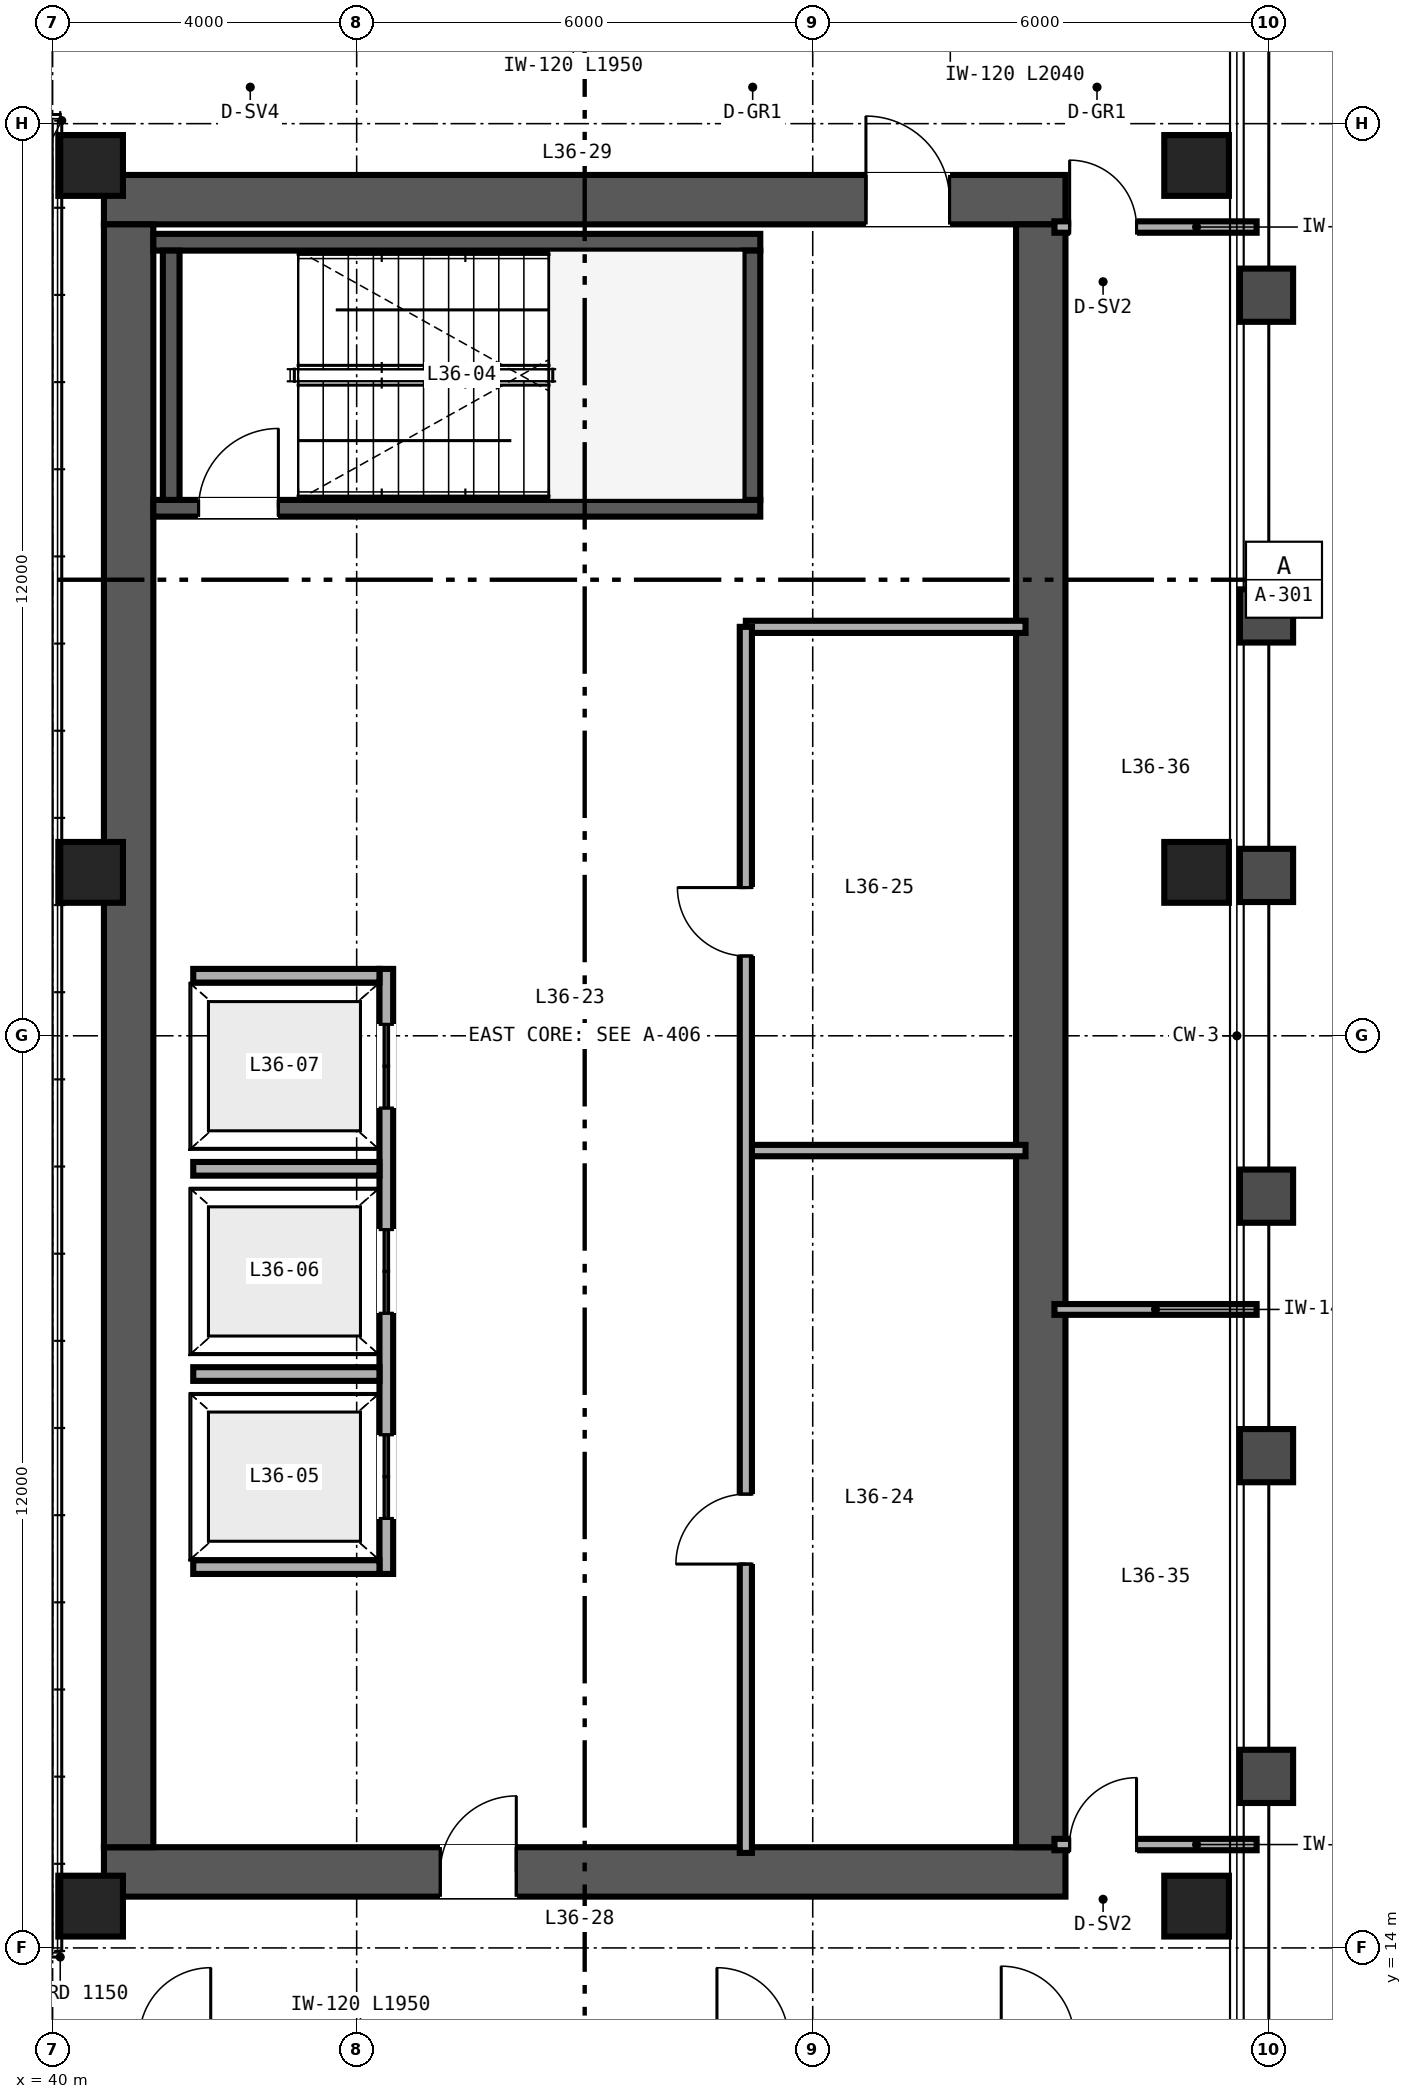
"""IFC4 building model, lengths in metres.
Left out: names, types, materials, properties, quantities, classifications, styles, units other than length and angle.
Written with IfcOpenShell. Run it as: python <this file> out.ifc"""

import sys

from ifc_helpers import new_model, si_unit, direction, frame, frame_2d, origin, origin_2d, place, context, subcontext, project, spatial, rectangle, hollow_rectangle, extrude, source, transform, mapped, element, fill, save


model = new_model("IFC4")
c1 = context("Model", 3, precision=1e-05, world=origin(), true_north=direction((0.0, 1.0)))
c2 = subcontext(c1, "Body", "Model", "MODEL_VIEW")
j1 = project(units=[si_unit("LENGTHUNIT", "METRE"), si_unit("PLANEANGLEUNIT", "RADIAN")], contexts=[c1])
p1 = place(None, origin())
s1 = spatial("IfcSite", under=j1, at=p1, CompositionType="ELEMENT")
p2 = place(p1, origin())
s2 = spatial("IfcBuilding", under=s1, at=p2, CompositionType="ELEMENT")
p3 = place(p2, frame((0.0, 0.0, 144.0)))
s3 = spatial("IfcBuildingStorey", under=s2, at=p3, CompositionType="ELEMENT", Elevation=144.0)
p4 = place(p3, frame((40.675, 15.0, 0.0), z_axis=(0.0, 0.0, 1.0), x_axis=(1.0, 0.0, 0.0)))
e1 = element("IfcWall", 1, at=p4, inside=s3, PredefinedType="SHEAR", context=c2, shape_type="SweptSolid", body=[
    extrude(rectangle(XDim=12.65, YDim=0.65, at=frame_2d((6.325, 0.0))), origin(), (0.0, 0.0, 1.0), 3.36),
])
p5 = place(p4, frame((4.425, 0.0, 0.0)))
e2 = element("IfcOpeningElement", 2, at=p5, cuts=e1, PredefinedType="OPENING", context=c2, shape_type="SweptSolid", body=[
    extrude(rectangle(XDim=1.0, YDim=2.15, at=frame_2d((0.5, 1.075))), frame((0.0, 0.335, 0.0), z_axis=(0.0, -1.0, 0.0), x_axis=(1.0, 0.0, 0.0)), (0.0, 0.0, 1.0), 0.67),
])
p6 = place(p3, frame((40.675, 37.0, 0.0), z_axis=(0.0, 0.0, 1.0), x_axis=(1.0, 0.0, 0.0)))
e3 = element("IfcWall", 3, at=p6, inside=s3, PredefinedType="SHEAR", context=c2, shape_type="SweptSolid", body=[
    extrude(rectangle(XDim=12.65, YDim=0.65, at=frame_2d((6.325, 0.0))), origin(), (0.0, 0.0, 1.0), 3.36),
])
p7 = place(p6, frame((10.025, 0.0, 0.0)))
e4 = element("IfcOpeningElement", 4, at=p7, cuts=e3, PredefinedType="OPENING", context=c2, shape_type="SweptSolid", body=[
    extrude(rectangle(XDim=1.1, YDim=2.15, at=frame_2d((0.55, 1.075))), frame((0.0, 0.335, 0.0), z_axis=(0.0, -1.0, 0.0), x_axis=(1.0, 0.0, 0.0)), (0.0, 0.0, 1.0), 0.67),
])
for number, where, z_axis, x_axis in (
    (5, (41.0, 15.325, 0.0), (0.0, 0.0, 1.0), (0.0, 1.0, 0.0)),
    (6, (53.0, 15.325, 0.0), (0.0, 0.0, 1.0), (0.0, 1.0, 0.0)),
):
    element("IfcWall", number, at=place(p3, frame(where, z_axis=z_axis, x_axis=x_axis)), inside=s3, PredefinedType="SHEAR", context=c2, shape_type="SweptSolid", body=[
        extrude(rectangle(XDim=21.35, YDim=0.65, at=frame_2d((10.675, 0.0))), origin(), (0.0, 0.0, 1.0), 3.36),
    ])
p8 = place(p3, frame((41.325, 32.94, 0.0), z_axis=(0.0, 0.0, 1.0), x_axis=(1.0, 0.0, 0.0)))
e7 = element("IfcWall", 7, at=p8, inside=s3, PredefinedType="SHEAR", context=c2, shape_type="SweptSolid", body=[
    extrude(rectangle(XDim=7.985, YDim=0.22, at=frame_2d((3.993, 0.0))), origin(), (0.0, 0.0, 1.0), 3.4),
])
p9 = place(p8, frame((0.595, 0.0, 0.0)))
e8 = element("IfcOpeningElement", 8, at=p9, cuts=e7, PredefinedType="OPENING", context=c2, shape_type="SweptSolid", body=[
    extrude(rectangle(XDim=1.05, YDim=2.15, at=frame_2d((0.525, 1.075))), frame((0.0, 0.12, 0.0), z_axis=(0.0, -1.0, 0.0), x_axis=(1.0, 0.0, 0.0)), (0.0, 0.0, 1.0), 0.24),
])
p10 = place(p3, frame((41.325, 36.44, 0.0), z_axis=(0.0, 0.0, 1.0), x_axis=(1.0, 0.0, 0.0)))
e9 = element("IfcWall", 9, at=p10, inside=s3, PredefinedType="SHEAR", context=c2, shape_type="SweptSolid", body=[
    extrude(rectangle(XDim=7.985, YDim=0.22, at=frame_2d((3.993, 0.0))), origin(), (0.0, 0.0, 1.0), 3.4),
])
for number, where, z_axis, x_axis in (
    (10, (41.56, 33.05, 0.0), (0.0, 0.0, 1.0), (0.0, 1.0, 0.0)),
    (11, (49.2, 33.05, 0.0), (0.0, 0.0, 1.0), (0.0, 1.0, 0.0)),
):
    element("IfcWall", number, at=place(p3, frame(where, z_axis=z_axis, x_axis=x_axis)), inside=s3, PredefinedType="SHEAR", context=c2, shape_type="SweptSolid", body=[
        extrude(rectangle(XDim=3.28, YDim=0.22, at=frame_2d((1.64, 0.0))), origin(), (0.0, 0.0, 1.0), 3.4),
    ])
m1 = source(origin(), c2, "Body", "SweptSolid", [
    extrude(hollow_rectangle(XDim=0.85, YDim=0.8, WallThickness=0.032, at=origin_2d()), origin(), (0.0, 0.0, 1.0), 3.36),
])
for number, where, z_axis, x_axis in (
    (12, (40.5, 14.55, 0.0), (0.0, 0.0, 1.0), (1.0, 0.0, 0.0)),
    (13, (55.05, 14.55, 0.0), (0.0, 0.0, 1.0), (1.0, 0.0, 0.0)),
    (14, (40.5, 28.15, 0.0), (0.0, 0.0, 1.0), (1.0, 0.0, 0.0)),
    (15, (55.05, 28.15, 0.0), (0.0, 0.0, 1.0), (1.0, 0.0, 0.0)),
    (16, (40.5, 37.45, 0.0), (0.0, 0.0, 1.0), (1.0, 0.0, 0.0)),
    (17, (55.05, 37.45, 0.0), (0.0, 0.0, 1.0), (1.0, 0.0, 0.0)),
):
    element("IfcColumn", number, at=place(p3, frame(where, z_axis=z_axis, x_axis=x_axis)), inside=s3, PredefinedType="COLUMN", context=c2, shape_type="MappedRepresentation", body=[
        mapped(m1, transform((0.0, 0.0, 0.0), scale=1.0)),
    ])
p11 = place(p3, frame((44.39, 18.92, 0.0), z_axis=(0.0, 0.0, 1.0), x_axis=(0.0, 1.0, 0.0)))
e18 = element("IfcWall", 18, at=p11, inside=s3, PredefinedType="SOLIDWALL", context=c2, shape_type="SweptSolid", body=[
    extrude(rectangle(XDim=7.96, YDim=0.18, at=frame_2d((3.98, 0.0))), origin(), (0.0, 0.0, 1.0), 3.36),
])
p12 = place(p11, frame((0.73, 0.0, 0.0)))
e19 = element("IfcOpeningElement", 19, at=p12, cuts=e18, PredefinedType="OPENING", context=c2, shape_type="SweptSolid", body=[
    extrude(rectangle(XDim=1.1, YDim=2.2, at=frame_2d((0.55, 1.1))), frame((0.0, 0.1, 0.0), z_axis=(0.0, -1.0, 0.0), x_axis=(1.0, 0.0, 0.0)), (0.0, 0.0, 1.0), 0.2),
])
p13 = place(p11, frame((3.43, 0.0, 0.0)))
e20 = element("IfcOpeningElement", 20, at=p13, cuts=e18, PredefinedType="OPENING", context=c2, shape_type="SweptSolid", body=[
    extrude(rectangle(XDim=1.1, YDim=2.2, at=frame_2d((0.55, 1.1))), frame((0.0, 0.1, 0.0), z_axis=(0.0, -1.0, 0.0), x_axis=(1.0, 0.0, 0.0)), (0.0, 0.0, 1.0), 0.2),
])
p14 = place(p11, frame((6.13, 0.0, 0.0)))
e21 = element("IfcOpeningElement", 21, at=p14, cuts=e18, PredefinedType="OPENING", context=c2, shape_type="SweptSolid", body=[
    extrude(rectangle(XDim=1.1, YDim=2.2, at=frame_2d((0.55, 1.1))), frame((0.0, 0.1, 0.0), z_axis=(0.0, -1.0, 0.0), x_axis=(1.0, 0.0, 0.0)), (0.0, 0.0, 1.0), 0.2),
])
for number, where, z_axis, x_axis in (
    (22, (41.85, 19.01, 0.0), (0.0, 0.0, 1.0), (1.0, 0.0, 0.0)),
    (23, (41.85, 26.79, 0.0), (0.0, 0.0, 1.0), (1.0, 0.0, 0.0)),
    (24, (41.85, 21.55, 0.0), (0.0, 0.0, 1.0), (1.0, 0.0, 0.0)),
    (25, (41.85, 24.25, 0.0), (0.0, 0.0, 1.0), (1.0, 0.0, 0.0)),
):
    element("IfcWall", number, at=place(p3, frame(where, z_axis=z_axis, x_axis=x_axis)), inside=s3, PredefinedType="SOLIDWALL", context=c2, shape_type="SweptSolid", body=[
        extrude(rectangle(XDim=2.45, YDim=0.18, at=frame_2d((1.225, 0.0))), origin(), (0.0, 0.0, 1.0), 3.36),
    ])
p15 = place(p3, frame((49.12, 31.38, 0.0), z_axis=(0.0, 0.0, 1.0), x_axis=(1.0, 0.0, 0.0)))
e26 = element("IfcWall", 26, at=p15, inside=s3, PredefinedType="PARTITIONING", context=c2, shape_type="SweptSolid", body=[
    extrude(rectangle(XDim=3.68, YDim=0.16, at=frame_2d((1.84, 0.0))), origin(), (0.0, 0.0, 1.0), 2.36),
])
p16 = place(p3, frame((49.12, 24.49, 0.0), z_axis=(0.0, 0.0, 1.0), x_axis=(1.0, 0.0, 0.0)))
e27 = element("IfcWall", 27, at=p16, inside=s3, PredefinedType="PARTITIONING", context=c2, shape_type="SweptSolid", body=[
    extrude(rectangle(XDim=3.68, YDim=0.15, at=frame_2d((1.84, 0.0))), origin(), (0.0, 0.0, 1.0), 3.36),
])
p17 = place(p3, frame((49.12, 15.25, 0.0), z_axis=(0.0, 0.0, 1.0), x_axis=(0.0, 1.0, 0.0)))
e28 = element("IfcWall", 28, at=p17, inside=s3, PredefinedType="PARTITIONING", context=c2, shape_type="SweptSolid", body=[
    extrude(rectangle(XDim=16.13, YDim=0.16, at=frame_2d((8.065, 0.0))), origin(), (0.0, 0.0, 1.0), 2.36),
])
p18 = place(p17, frame((3.8, 0.0, 0.0)))
e29 = element("IfcOpeningElement", 29, at=p18, cuts=e28, PredefinedType="OPENING", context=c2, shape_type="SweptSolid", body=[
    extrude(rectangle(XDim=0.92, YDim=2.15, at=frame_2d((0.46, 1.075))), frame((0.0, 0.09, 0.0), z_axis=(0.0, -1.0, 0.0), x_axis=(1.0, 0.0, 0.0)), (0.0, 0.0, 1.0), 0.18),
])
p19 = place(p17, frame((11.8, 0.0, 0.0)))
e30 = element("IfcOpeningElement", 30, at=p19, cuts=e28, PredefinedType="OPENING", context=c2, shape_type="SweptSolid", body=[
    extrude(rectangle(XDim=0.9, YDim=2.15, at=frame_2d((0.45, 1.075))), frame((0.0, 0.09, 0.0), z_axis=(0.0, -1.0, 0.0), x_axis=(1.0, 0.0, 0.0)), (0.0, 0.0, 1.0), 0.18),
])
p20 = place(p3, frame((53.18, 15.36, 0.0), z_axis=(0.0, 0.0, 1.0), x_axis=(1.0, 0.0, 0.0)))
e31 = element("IfcWall", 31, at=p20, inside=s3, PredefinedType="PARTITIONING", context=c2, shape_type="SweptSolid", body=[
    extrude(rectangle(XDim=2.66, YDim=0.15, at=frame_2d((1.33, 0.0))), origin(), (0.0, 0.0, 1.0), 2.581),
])
p21 = place(p20, frame((0.2, 0.0, 0.0)))
e32 = element("IfcOpeningElement", 32, at=p21, cuts=e31, PredefinedType="OPENING", context=c2, shape_type="SweptSolid", body=[
    extrude(rectangle(XDim=0.88, YDim=2.15, at=frame_2d((0.44, 1.075))), frame((0.0, 0.085, 0.0), z_axis=(0.0, -1.0, 0.0), x_axis=(1.0, 0.0, 0.0)), (0.0, 0.0, 1.0), 0.17),
])
p22 = place(p3, frame((53.18, 36.64, 0.0), z_axis=(0.0, 0.0, 1.0), x_axis=(1.0, 0.0, 0.0)))
e33 = element("IfcWall", 33, at=p22, inside=s3, PredefinedType="PARTITIONING", context=c2, shape_type="SweptSolid", body=[
    extrude(rectangle(XDim=2.66, YDim=0.15, at=frame_2d((1.33, 0.0))), origin(), (0.0, 0.0, 1.0), 2.743),
])
p23 = place(p22, frame((0.2, 0.0, 0.0)))
e34 = element("IfcOpeningElement", 34, at=p23, cuts=e33, PredefinedType="OPENING", context=c2, shape_type="SweptSolid", body=[
    extrude(rectangle(XDim=0.88, YDim=2.15, at=frame_2d((0.44, 1.075))), frame((0.0, 0.085, 0.0), z_axis=(0.0, -1.0, 0.0), x_axis=(1.0, 0.0, 0.0)), (0.0, 0.0, 1.0), 0.17),
])
p24 = place(p3, frame((53.18, 22.4, 0.0), z_axis=(0.0, 0.0, 1.0), x_axis=(1.0, 0.0, 0.0)))
e35 = element("IfcWall", 35, at=p24, inside=s3, PredefinedType="PARTITIONING", context=c2, shape_type="SweptSolid", body=[
    extrude(rectangle(XDim=2.66, YDim=0.142, at=frame_2d((1.33, 0.0))), origin(), (0.0, 0.0, 1.0), 2.581),
])
m2 = source(origin(), c2, "Body", "SweptSolid", [
    extrude(rectangle(XDim=1.05, YDim=2.15, at=frame_2d((0.525, 1.075))), frame((0.0, 0.025, 0.0), z_axis=(0.0, -1.0, 0.0), x_axis=(1.0, 0.0, 0.0)), (0.0, 0.0, 1.0), 0.05),
])
p25 = place(p9, origin())
e36 = element("IfcDoor", 36, at=p25, inside=s3, OperationType="SINGLE_SWING_RIGHT", PredefinedType="DOOR", context=c2, shape_type="MappedRepresentation", body=[
    mapped(m2, transform((0.0, 0.0, 0.0), scale=1.0)),
])
fill(e8, e36)
m3 = source(origin(), c2, "Body", "SweptSolid", [
    extrude(rectangle(XDim=1.1, YDim=2.2, at=frame_2d((0.55, 1.1))), frame((0.0, 0.025, 0.0), z_axis=(0.0, -1.0, 0.0), x_axis=(1.0, 0.0, 0.0)), (0.0, 0.0, 1.0), 0.05),
])
p26 = place(p12, origin())
e37 = element("IfcDoor", 37, at=p26, inside=s3, OperationType="DOUBLE_DOOR_SLIDING", PredefinedType="DOOR", context=c2, shape_type="MappedRepresentation", body=[
    mapped(m3, transform((0.0, 0.0, 0.0), scale=1.0)),
])
fill(e19, e37)
p27 = place(p13, origin())
e38 = element("IfcDoor", 38, at=p27, inside=s3, OperationType="DOUBLE_DOOR_SLIDING", PredefinedType="DOOR", context=c2, shape_type="MappedRepresentation", body=[
    mapped(m3, transform((0.0, 0.0, 0.0), scale=1.0)),
])
fill(e20, e38)
p28 = place(p14, origin())
e39 = element("IfcDoor", 39, at=p28, inside=s3, OperationType="DOUBLE_DOOR_SLIDING", PredefinedType="DOOR", context=c2, shape_type="MappedRepresentation", body=[
    mapped(m3, transform((0.0, 0.0, 0.0), scale=1.0)),
])
fill(e21, e39)
m4 = source(origin(), c2, "Body", "SweptSolid", [
    extrude(rectangle(XDim=1.0, YDim=2.15, at=frame_2d((0.5, 1.075))), frame((0.0, 0.025, 0.0), z_axis=(0.0, -1.0, 0.0), x_axis=(1.0, 0.0, 0.0)), (0.0, 0.0, 1.0), 0.05),
])
p29 = place(p5, origin())
e40 = element("IfcDoor", 40, at=p29, inside=s3, OperationType="SINGLE_SWING_RIGHT", PredefinedType="DOOR", context=c2, shape_type="MappedRepresentation", body=[
    mapped(m4, transform((0.0, 0.0, 0.0), scale=1.0)),
])
fill(e2, e40)
m5 = source(origin(), c2, "Body", "SweptSolid", [
    extrude(rectangle(XDim=1.1, YDim=2.15, at=frame_2d((0.55, 1.075))), frame((0.0, 0.025, 0.0), z_axis=(0.0, -1.0, 0.0), x_axis=(1.0, 0.0, 0.0)), (0.0, 0.0, 1.0), 0.05),
])
p30 = place(p7, origin())
e41 = element("IfcDoor", 41, at=p30, inside=s3, OperationType="SINGLE_SWING_LEFT", PredefinedType="DOOR", context=c2, shape_type="MappedRepresentation", body=[
    mapped(m5, transform((0.0, 0.0, 0.0), scale=1.0)),
])
fill(e4, e41)
m6 = source(origin(), c2, "Body", "SweptSolid", [
    extrude(rectangle(XDim=0.92, YDim=2.15, at=frame_2d((0.46, 1.075))), frame((0.0, 0.025, 0.0), z_axis=(0.0, -1.0, 0.0), x_axis=(1.0, 0.0, 0.0)), (0.0, 0.0, 1.0), 0.05),
])
p31 = place(p18, origin())
e42 = element("IfcDoor", 42, at=p31, inside=s3, OperationType="SINGLE_SWING_LEFT", PredefinedType="DOOR", context=c2, shape_type="MappedRepresentation", body=[
    mapped(m6, transform((0.0, 0.0, 0.0), scale=1.0)),
])
fill(e29, e42)
m7 = source(origin(), c2, "Body", "SweptSolid", [
    extrude(rectangle(XDim=0.9, YDim=2.15, at=frame_2d((0.45, 1.075))), frame((0.0, 0.025, 0.0), z_axis=(0.0, -1.0, 0.0), x_axis=(1.0, 0.0, 0.0)), (0.0, 0.0, 1.0), 0.05),
])
p32 = place(p19, origin())
e43 = element("IfcDoor", 43, at=p32, inside=s3, OperationType="SINGLE_SWING_RIGHT", PredefinedType="DOOR", context=c2, shape_type="MappedRepresentation", body=[
    mapped(m7, transform((0.0, 0.0, 0.0), scale=1.0)),
])
fill(e30, e43)
m8 = source(origin(), c2, "Body", "SweptSolid", [
    extrude(rectangle(XDim=0.88, YDim=2.15, at=frame_2d((0.44, 1.075))), frame((0.0, 0.025, 0.0), z_axis=(0.0, -1.0, 0.0), x_axis=(1.0, 0.0, 0.0)), (0.0, 0.0, 1.0), 0.05),
])
p33 = place(p21, origin())
e44 = element("IfcDoor", 44, at=p33, inside=s3, OperationType="SINGLE_SWING_RIGHT", PredefinedType="DOOR", context=c2, shape_type="MappedRepresentation", body=[
    mapped(m8, transform((0.0, 0.0, 0.0), scale=1.0)),
])
fill(e32, e44)
p34 = place(p23, origin())
e45 = element("IfcDoor", 45, at=p34, inside=s3, OperationType="SINGLE_SWING_LEFT", PredefinedType="DOOR", context=c2, shape_type="MappedRepresentation", body=[
    mapped(m8, transform((0.0, 0.0, 0.0), scale=1.0)),
])
fill(e34, e45)
save(model, sys.argv[1])
